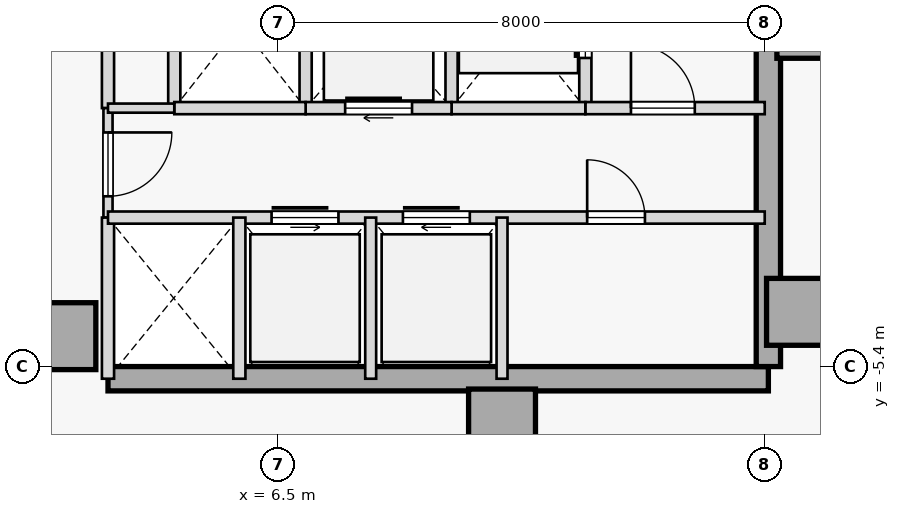
"""IFC4 building model, lengths in metres.
Left out: names, types, materials, properties, quantities, classifications, styles, units other than length and angle.
Written with IfcOpenShell. Run it as: python <this file> out.ifc"""

import sys

from ifc_helpers import new_model, si_unit, direction, frame, frame_2d, origin, origin_2d, place, context, subcontext, project, spatial, rectangle, extrude, element, fill, save


model = new_model("IFC4")
c1 = context("Model", 3, precision=1e-05, world=origin(), true_north=direction((0.0, 1.0)))
c2 = subcontext(c1, "Body", "Model", "MODEL_VIEW")
j1 = project(units=[si_unit("LENGTHUNIT", "METRE"), si_unit("PLANEANGLEUNIT", "RADIAN")], contexts=[c1])
p1 = place(None, origin())
s1 = spatial("IfcSite", under=j1, at=p1, CompositionType="ELEMENT")
p2 = place(p1, origin())
s2 = spatial("IfcBuilding", under=s1, at=p2, CompositionType="ELEMENT")
p3 = place(p2, frame((0.0, 0.0, 168.4)))
s3 = spatial("IfcBuildingStorey", under=s2, at=p3, CompositionType="ELEMENT", Elevation=168.4)
for number, where, z_axis, x_axis in (
    (1, (15.25, 0.22, 0.0), (0.0, 0.0, 1.0), (1.0, 0.0, 0.0)),
    (2, (15.08, -4.5, 0.0), (0.0, 0.0, 1.0), (1.0, 0.0, 0.0)),
    (3, (10.18, -6.32, 0.0), (0.0, 0.0, 1.0), (1.0, 0.0, 0.0)),
    (4, (2.95, -4.9, 0.0), (0.0, 0.0, 1.0), (1.0, 0.0, 0.0)),
):
    element("IfcColumn", number, at=place(p3, frame(where, z_axis=z_axis, x_axis=x_axis)), inside=s3, PredefinedType="COLUMN", context=c2, shape_type="SweptSolid", body=[
        extrude(rectangle(XDim=1.1, YDim=1.1, at=origin_2d()), origin(), (0.0, 0.0, 1.0), 3.4),
    ])
p4 = place(p3, frame((3.7, -5.6, 0.0), z_axis=(0.0, 0.0, 1.0), x_axis=(1.0, 0.0, 0.0)))
e5 = element("IfcWall", 5, at=p4, inside=s3, PredefinedType="SHEAR", context=c2, shape_type="SweptSolid", body=[
    extrude(rectangle(XDim=10.86, YDim=0.4, at=frame_2d((5.43, 0.0))), origin(), (0.0, 0.0, 1.0), 3.175),
])
p5 = place(p3, frame((14.56, -5.4, 0.0), z_axis=(0.0, 0.0, 1.0), x_axis=(0.0, 1.0, 0.0)))
e6 = element("IfcWall", 6, at=p5, inside=s3, PredefinedType="SHEAR", context=c2, shape_type="SweptSolid", body=[
    extrude(rectangle(XDim=10.8, YDim=0.4, at=frame_2d((5.4, 0.0))), origin(), (0.0, 0.0, 1.0), 3.175),
])
p6 = place(p3, frame((3.7, -1.15, 0.0), z_axis=(0.0, 0.0, 1.0), x_axis=(0.0, 1.0, 0.0)))
e7 = element("IfcWall", 7, at=p6, inside=s3, PredefinedType="STANDARD", context=c2, shape_type="SweptSolid", body=[
    extrude(rectangle(XDim=6.75, YDim=0.2, at=frame_2d((3.375, 0.0))), origin(), (0.0, 0.0, 1.0), 3.175),
])
p7 = place(p6, frame((1.1, 0.0, 0.0)))
e8 = element("IfcOpeningElement", 8, at=p7, cuts=e7, PredefinedType="OPENING", context=c2, shape_type="SweptSolid", body=[
    extrude(rectangle(XDim=0.9, YDim=2.15, at=frame_2d((0.45, 1.075))), frame((0.0, 0.11, 0.0), z_axis=(0.0, -1.0, 0.0), x_axis=(1.0, 0.0, 0.0)), (0.0, 0.0, 1.0), 0.22),
])
p8 = place(p6, frame((4.0, 0.0, 0.0)))
e9 = element("IfcOpeningElement", 9, at=p8, cuts=e7, PredefinedType="OPENING", context=c2, shape_type="SweptSolid", body=[
    extrude(rectangle(XDim=0.92, YDim=2.15, at=frame_2d((0.46, 1.075))), frame((0.0, 0.11, 0.0), z_axis=(0.0, -1.0, 0.0), x_axis=(1.0, 0.0, 0.0)), (0.0, 0.0, 1.0), 0.22),
])
p9 = place(p3, frame((3.7, -2.95, 0.0), z_axis=(0.0, 0.0, 1.0), x_axis=(0.0, 1.0, 0.0)))
e10 = element("IfcWall", 10, at=p9, inside=s3, PredefinedType="PARTITIONING", context=c2, shape_type="SweptSolid", body=[
    extrude(rectangle(XDim=1.8, YDim=0.15, at=frame_2d((0.9, 0.0))), origin(), (0.0, 0.0, 1.0), 3.175),
])
p10 = place(p9, frame((0.35, 0.0, 0.0)))
e11 = element("IfcOpeningElement", 11, at=p10, cuts=e10, PredefinedType="OPENING", context=c2, shape_type="SweptSolid", body=[
    extrude(rectangle(XDim=1.05, YDim=2.18, at=frame_2d((0.525, 1.09))), frame((0.0, 0.085, 0.0), z_axis=(0.0, -1.0, 0.0), x_axis=(1.0, 0.0, 0.0)), (0.0, 0.0, 1.0), 0.17),
])
p11 = place(p3, frame((3.7, -5.6, 0.0), z_axis=(0.0, 0.0, 1.0), x_axis=(0.0, 1.0, 0.0)))
e12 = element("IfcWall", 12, at=p11, inside=s3, PredefinedType="STANDARD", context=c2, shape_type="SweptSolid", body=[
    extrude(rectangle(XDim=2.65, YDim=0.2, at=frame_2d((1.325, 0.0))), origin(), (0.0, 0.0, 1.0), 3.175),
])
p12 = place(p3, frame((11.55, -1.15, 0.0), z_axis=(0.0, 0.0, 1.0), x_axis=(0.0, 1.0, 0.0)))
e13 = element("IfcWall", 13, at=p12, inside=s3, PredefinedType="STANDARD", context=c2, shape_type="SweptSolid", body=[
    extrude(rectangle(XDim=2.75, YDim=0.2, at=frame_2d((1.375, 0.0))), origin(), (0.0, 0.0, 1.0), 3.175),
])
p13 = place(p12, frame((0.825, 0.0, 0.0)))
e14 = element("IfcOpeningElement", 14, at=p13, cuts=e13, PredefinedType="OPENING", context=c2, shape_type="SweptSolid", body=[
    extrude(rectangle(XDim=1.1, YDim=2.15, at=frame_2d((0.55, 1.075))), frame((0.0, 0.11, 0.0), z_axis=(0.0, -1.0, 0.0), x_axis=(1.0, 0.0, 0.0)), (0.0, 0.0, 1.0), 0.22),
])
p14 = place(p3, frame((9.35, -1.15, 0.0), z_axis=(0.0, 0.0, 1.0), x_axis=(0.0, 1.0, 0.0)))
e15 = element("IfcWall", 15, at=p14, inside=s3, PredefinedType="STANDARD", context=c2, shape_type="SweptSolid", body=[
    extrude(rectangle(XDim=2.75, YDim=0.2, at=frame_2d((1.375, 0.0))), origin(), (0.0, 0.0, 1.0), 3.175),
])
p15 = place(p3, frame((11.55, -1.15, 0.0), z_axis=(0.0, 0.0, 1.0), x_axis=(1.0, 0.0, 0.0)))
e16 = element("IfcWall", 16, at=p15, inside=s3, PredefinedType="STANDARD", context=c2, shape_type="SweptSolid", body=[
    extrude(rectangle(XDim=2.95, YDim=0.2, at=frame_2d((1.475, 0.0))), origin(), (0.0, 0.0, 1.0), 3.175),
])
p16 = place(p15, frame((0.75, 0.0, 0.0)))
e17 = element("IfcOpeningElement", 17, at=p16, cuts=e16, PredefinedType="OPENING", context=c2, shape_type="SweptSolid", body=[
    extrude(rectangle(XDim=1.05, YDim=2.18, at=frame_2d((0.525, 1.09))), frame((0.0, 0.11, 0.0), z_axis=(0.0, -1.0, 0.0), x_axis=(1.0, 0.0, 0.0)), (0.0, 0.0, 1.0), 0.22),
])
p17 = place(p3, frame((9.35, -1.15, 0.0), z_axis=(0.0, 0.0, 1.0), x_axis=(1.0, 0.0, 0.0)))
e18 = element("IfcWall", 18, at=p17, inside=s3, PredefinedType="STANDARD", context=c2, shape_type="SweptSolid", body=[
    extrude(rectangle(XDim=2.2, YDim=0.2, at=frame_2d((1.1, 0.0))), origin(), (0.0, 0.0, 1.0), 3.175),
])
p18 = place(p3, frame((6.95, -1.15, 0.0), z_axis=(0.0, 0.0, 1.0), x_axis=(0.0, 1.0, 0.0)))
e19 = element("IfcWall", 19, at=p18, inside=s3, PredefinedType="STANDARD", context=c2, shape_type="SweptSolid", body=[
    extrude(rectangle(XDim=2.75, YDim=0.2, at=frame_2d((1.375, 0.0))), origin(), (0.0, 0.0, 1.0), 3.175),
])
p19 = place(p3, frame((6.95, -1.15, 0.0), z_axis=(0.0, 0.0, 1.0), x_axis=(1.0, 0.0, 0.0)))
e20 = element("IfcWall", 20, at=p19, inside=s3, PredefinedType="STANDARD", context=c2, shape_type="SweptSolid", body=[
    extrude(rectangle(XDim=2.4, YDim=0.2, at=frame_2d((1.2, 0.0))), origin(), (0.0, 0.0, 1.0), 3.175),
])
p20 = place(p19, frame((0.65, 0.0, 0.0)))
e21 = element("IfcOpeningElement", 21, at=p20, cuts=e20, PredefinedType="OPENING", context=c2, shape_type="SweptSolid", body=[
    extrude(rectangle(XDim=1.1, YDim=2.15, at=frame_2d((0.55, 1.075))), frame((0.0, 0.11, 0.0), z_axis=(0.0, -1.0, 0.0), x_axis=(1.0, 0.0, 0.0)), (0.0, 0.0, 1.0), 0.22),
])
p21 = place(p3, frame((4.79, -1.15, 0.0), z_axis=(0.0, 0.0, 1.0), x_axis=(0.0, 1.0, 0.0)))
e22 = element("IfcWall", 22, at=p21, inside=s3, PredefinedType="STANDARD", context=c2, shape_type="SweptSolid", body=[
    extrude(rectangle(XDim=2.75, YDim=0.2, at=frame_2d((1.375, 0.0))), origin(), (0.0, 0.0, 1.0), 3.175),
])
p22 = place(p3, frame((4.79, -1.15, 0.0), z_axis=(0.0, 0.0, 1.0), x_axis=(1.0, 0.0, 0.0)))
e23 = element("IfcWall", 23, at=p22, inside=s3, PredefinedType="STANDARD", context=c2, shape_type="SweptSolid", body=[
    extrude(rectangle(XDim=2.16, YDim=0.2, at=frame_2d((1.08, 0.0))), origin(), (0.0, 0.0, 1.0), 3.175),
])
p23 = place(p3, frame((3.7, -1.15, 0.0), z_axis=(0.0, 0.0, 1.0), x_axis=(1.0, 0.0, 0.0)))
e24 = element("IfcWall", 24, at=p23, inside=s3, PredefinedType="PARTITIONING", context=c2, shape_type="SweptSolid", body=[
    extrude(rectangle(XDim=1.09, YDim=0.15, at=frame_2d((0.545, 0.0))), origin(), (0.0, 0.0, 1.0), 3.175),
])
p24 = place(p3, frame((3.7, -2.95, 0.0), z_axis=(0.0, 0.0, 1.0), x_axis=(1.0, 0.0, 0.0)))
e25 = element("IfcWall", 25, at=p24, inside=s3, PredefinedType="STANDARD", context=c2, shape_type="SweptSolid", body=[
    extrude(rectangle(XDim=10.8, YDim=0.2, at=frame_2d((5.4, 0.0))), origin(), (0.0, 0.0, 1.0), 3.175),
])
p25 = place(p24, frame((2.69, 0.0, 0.0)))
e26 = element("IfcOpeningElement", 26, at=p25, cuts=e25, PredefinedType="OPENING", context=c2, shape_type="SweptSolid", body=[
    extrude(rectangle(XDim=1.1, YDim=2.15, at=frame_2d((0.55, 1.075))), frame((0.0, 0.11, 0.0), z_axis=(0.0, -1.0, 0.0), x_axis=(1.0, 0.0, 0.0)), (0.0, 0.0, 1.0), 0.22),
])
p26 = place(p24, frame((4.85, 0.0, 0.0)))
e27 = element("IfcOpeningElement", 27, at=p26, cuts=e25, PredefinedType="OPENING", context=c2, shape_type="SweptSolid", body=[
    extrude(rectangle(XDim=1.1, YDim=2.15, at=frame_2d((0.55, 1.075))), frame((0.0, 0.11, 0.0), z_axis=(0.0, -1.0, 0.0), x_axis=(1.0, 0.0, 0.0)), (0.0, 0.0, 1.0), 0.22),
])
p27 = place(p24, frame((7.88, 0.0, 0.0)))
e28 = element("IfcOpeningElement", 28, at=p27, cuts=e25, PredefinedType="OPENING", context=c2, shape_type="SweptSolid", body=[
    extrude(rectangle(XDim=0.95, YDim=2.15, at=frame_2d((0.475, 1.075))), frame((0.0, 0.11, 0.0), z_axis=(0.0, -1.0, 0.0), x_axis=(1.0, 0.0, 0.0)), (0.0, 0.0, 1.0), 0.22),
])
p28 = place(p3, frame((5.86, -5.6, 0.0), z_axis=(0.0, 0.0, 1.0), x_axis=(0.0, 1.0, 0.0)))
e29 = element("IfcWall", 29, at=p28, inside=s3, PredefinedType="STANDARD", context=c2, shape_type="SweptSolid", body=[
    extrude(rectangle(XDim=2.65, YDim=0.2, at=frame_2d((1.325, 0.0))), origin(), (0.0, 0.0, 1.0), 3.175),
])
for number, where, z_axis, x_axis in (
    (30, (10.18, -5.6, 0.0), (0.0, 0.0, 1.0), (0.0, 1.0, 0.0)),
    (31, (8.02, -5.6, 0.0), (0.0, 0.0, 1.0), (0.0, 1.0, 0.0)),
):
    element("IfcWall", number, at=place(p3, frame(where, z_axis=z_axis, x_axis=x_axis)), inside=s3, PredefinedType="STANDARD", context=c2, shape_type="SweptSolid", body=[
        extrude(rectangle(XDim=2.65, YDim=0.18, at=frame_2d((1.325, 0.0))), origin(), (0.0, 0.0, 1.0), 3.175),
    ])
p29 = place(p16, origin())
e32 = element("IfcDoor", 32, at=p29, inside=s3, OperationType="SINGLE_SWING_LEFT", PredefinedType="DOOR", context=c2, shape_type="SweptSolid", body=[
    extrude(rectangle(XDim=1.05, YDim=2.18, at=frame_2d((0.525, 1.09))), frame((0.0, 0.025, 0.0), z_axis=(0.0, -1.0, 0.0), x_axis=(1.0, 0.0, 0.0)), (0.0, 0.0, 1.0), 0.05),
])
fill(e17, e32)
p30 = place(p10, frame((1.05, 0.0, 0.0), z_axis=(0.0, 0.0, 1.0), x_axis=(-1.0, 0.0, 0.0)))
e33 = element("IfcDoor", 33, at=p30, inside=s3, OperationType="SINGLE_SWING_RIGHT", PredefinedType="DOOR", context=c2, shape_type="SweptSolid", body=[
    extrude(rectangle(XDim=1.05, YDim=2.18, at=frame_2d((0.525, 1.09))), frame((0.0, 0.025, 0.0), z_axis=(0.0, -1.0, 0.0), x_axis=(1.0, 0.0, 0.0)), (0.0, 0.0, 1.0), 0.05),
])
fill(e11, e33)
p31 = place(p13, origin())
e34 = element("IfcDoor", 34, at=p31, inside=s3, OperationType="SLIDING_TO_RIGHT", PredefinedType="DOOR", context=c2, shape_type="SweptSolid", body=[
    extrude(rectangle(XDim=1.1, YDim=2.15, at=frame_2d((0.55, 1.075))), frame((0.0, 0.025, 0.0), z_axis=(0.0, -1.0, 0.0), x_axis=(1.0, 0.0, 0.0)), (0.0, 0.0, 1.0), 0.05),
])
fill(e14, e34)
p32 = place(p20, origin())
e35 = element("IfcDoor", 35, at=p32, inside=s3, OperationType="SLIDING_TO_RIGHT", PredefinedType="DOOR", context=c2, shape_type="SweptSolid", body=[
    extrude(rectangle(XDim=1.1, YDim=2.15, at=frame_2d((0.55, 1.075))), frame((0.0, 0.025, 0.0), z_axis=(0.0, -1.0, 0.0), x_axis=(1.0, 0.0, 0.0)), (0.0, 0.0, 1.0), 0.05),
])
fill(e21, e35)
p33 = place(p25, origin())
e36 = element("IfcDoor", 36, at=p33, inside=s3, OperationType="SLIDING_TO_LEFT", PredefinedType="DOOR", context=c2, shape_type="SweptSolid", body=[
    extrude(rectangle(XDim=1.1, YDim=2.15, at=frame_2d((0.55, 1.075))), frame((0.0, 0.025, 0.0), z_axis=(0.0, -1.0, 0.0), x_axis=(1.0, 0.0, 0.0)), (0.0, 0.0, 1.0), 0.05),
])
fill(e26, e36)
p34 = place(p26, origin())
e37 = element("IfcDoor", 37, at=p34, inside=s3, OperationType="SLIDING_TO_RIGHT", PredefinedType="DOOR", context=c2, shape_type="SweptSolid", body=[
    extrude(rectangle(XDim=1.1, YDim=2.15, at=frame_2d((0.55, 1.075))), frame((0.0, 0.025, 0.0), z_axis=(0.0, -1.0, 0.0), x_axis=(1.0, 0.0, 0.0)), (0.0, 0.0, 1.0), 0.05),
])
fill(e27, e37)
p35 = place(p27, origin())
e38 = element("IfcDoor", 38, at=p35, inside=s3, OperationType="SINGLE_SWING_LEFT", PredefinedType="DOOR", context=c2, shape_type="SweptSolid", body=[
    extrude(rectangle(XDim=0.95, YDim=2.15, at=frame_2d((0.475, 1.075))), frame((0.0, 0.025, 0.0), z_axis=(0.0, -1.0, 0.0), x_axis=(1.0, 0.0, 0.0)), (0.0, 0.0, 1.0), 0.05),
])
fill(e28, e38)
save(model, sys.argv[1])
